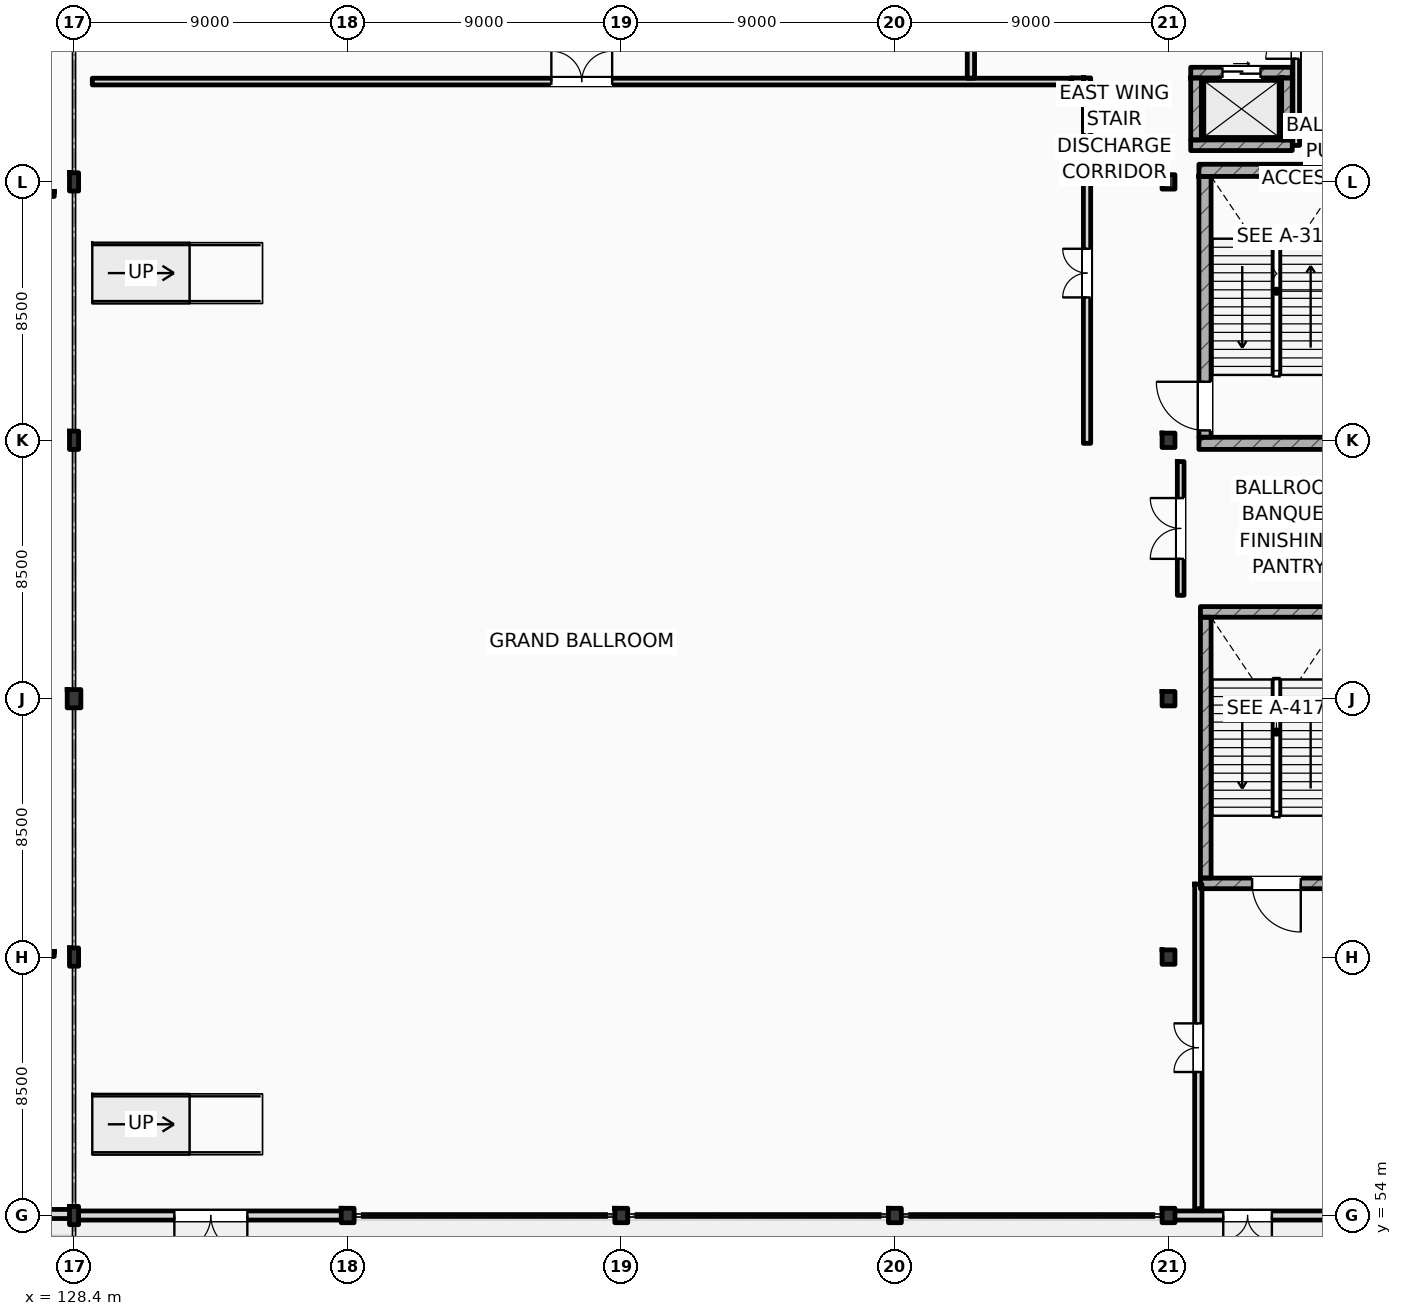
"""IFC4 building model, lengths in metres.
Left out: names, types, materials, properties, quantities, classifications, styles, units other than length and angle.
Written with IfcOpenShell. Run it as: python <this file> out.ifc"""

import sys

from ifc_helpers import new_model, si_unit, direction, frame, frame_2d, origin, origin_2d, place, context, subcontext, project, spatial, rectangle, i_section, extrude, element, fill, save


model = new_model("IFC4")
c1 = context("Model", 3, precision=1e-05, world=origin(), true_north=direction((0.0, 1.0)))
c2 = subcontext(c1, "Body", "Model", "MODEL_VIEW")
j1 = project(units=[si_unit("LENGTHUNIT", "METRE"), si_unit("PLANEANGLEUNIT", "RADIAN")], contexts=[c1])
p1 = place(None, origin())
s1 = spatial("IfcSite", under=j1, at=p1, CompositionType="ELEMENT")
p2 = place(p1, origin())
s2 = spatial("IfcBuilding", under=s1, at=p2, CompositionType="ELEMENT")
p3 = place(p2, origin())
s3 = spatial("IfcBuildingStorey", under=s2, at=p3, CompositionType="ELEMENT", Elevation=0.0)
for number, where, z_axis, x_axis in (
    (1, (128.4, 54.0, 0.0), (0.0, 0.0, 1.0), (1.0, 0.0, 0.0)),
    (2, (128.4, 62.5, 0.0), (0.0, 0.0, 1.0), (1.0, 0.0, 0.0)),
):
    element("IfcColumn", number, at=place(p3, frame(where, z_axis=z_axis, x_axis=x_axis)), inside=s3, PredefinedType="COLUMN", context=c2, shape_type="SweptSolid", body=[
        extrude(i_section(OverallWidth=0.3, OverallDepth=0.6, WebThickness=0.015, FlangeThickness=0.03, FilletRadius=0.027, at=origin_2d()), origin(), (0.0, 0.0, 1.0), 6.0),
    ])
p4 = place(p3, frame((128.4, 71.0, 0.0), z_axis=(0.0, 0.0, 1.0), x_axis=(1.0, 0.0, 0.0)))
e3 = element("IfcColumn", 3, at=p4, inside=s3, PredefinedType="PILASTER", context=c2, shape_type="SweptSolid", body=[
    extrude(rectangle(XDim=0.45, YDim=0.6, at=origin_2d()), origin(), (0.0, 0.0, 1.0), 6.0),
])
for number, where, z_axis, x_axis in (
    (4, (128.4, 79.5, 0.0), (0.0, 0.0, 1.0), (1.0, 0.0, 0.0)),
    (5, (128.4, 88.0, 0.0), (0.0, 0.0, 1.0), (1.0, 0.0, 0.0)),
):
    element("IfcColumn", number, at=place(p3, frame(where, z_axis=z_axis, x_axis=x_axis)), inside=s3, PredefinedType="COLUMN", context=c2, shape_type="SweptSolid", body=[
        extrude(i_section(OverallWidth=0.3, OverallDepth=0.6, WebThickness=0.015, FlangeThickness=0.03, FilletRadius=0.027, at=origin_2d()), origin(), (0.0, 0.0, 1.0), 6.0),
    ])
for number, where, z_axis, x_axis in (
    (6, (164.4, 54.0, 0.0), (0.0, 0.0, 1.0), (1.0, 0.0, 0.0)),
    (7, (164.4, 62.5, 0.0), (0.0, 0.0, 1.0), (1.0, 0.0, 0.0)),
    (8, (164.4, 71.0, 0.0), (0.0, 0.0, 1.0), (1.0, 0.0, 0.0)),
    (9, (164.4, 79.5, 0.0), (0.0, 0.0, 1.0), (1.0, 0.0, 0.0)),
    (10, (164.4, 88.0, 0.0), (0.0, 0.0, 1.0), (1.0, 0.0, 0.0)),
    (11, (137.4, 54.0, 0.0), (0.0, 0.0, 1.0), (1.0, 0.0, 0.0)),
    (12, (146.4, 54.0, 0.0), (0.0, 0.0, 1.0), (1.0, 0.0, 0.0)),
    (13, (155.4, 54.0, 0.0), (0.0, 0.0, 1.0), (1.0, 0.0, 0.0)),
):
    element("IfcColumn", number, at=place(p3, frame(where, z_axis=z_axis, x_axis=x_axis)), inside=s3, PredefinedType="COLUMN", context=c2, shape_type="SweptSolid", body=[
        extrude(i_section(OverallWidth=0.424, OverallDepth=0.474, WebThickness=0.045, FlangeThickness=0.055, FilletRadius=0.015, at=origin_2d()), origin(), (0.0, 0.0, 1.0), 6.0),
    ])
for number, where, z_axis, x_axis in (
    (14, (165.4, 88.38, 0.0), (0.0, 0.0, 1.0), (1.0, 0.0, 0.0)),
    (15, (165.4, 79.4, 0.0), (0.0, 0.0, 1.0), (1.0, 0.0, 0.0)),
):
    element("IfcWall", number, at=place(p3, frame(where, z_axis=z_axis, x_axis=x_axis)), inside=s3, PredefinedType="SHEAR", context=c2, shape_type="SweptSolid", body=[
        extrude(rectangle(XDim=5.1, YDim=0.4, at=frame_2d((2.55, 0.0))), origin(), (0.0, 0.0, 1.0), 6.0),
    ])
p5 = place(p3, frame((165.6, 79.6, 0.0), z_axis=(0.0, 0.0, 1.0), x_axis=(0.0, 1.0, 0.0)))
e16 = element("IfcWall", 16, at=p5, inside=s3, PredefinedType="SHEAR", context=c2, shape_type="SweptSolid", body=[
    extrude(rectangle(XDim=8.58, YDim=0.4, at=frame_2d((4.29, 0.0))), origin(), (0.0, 0.0, 1.0), 6.0),
])
p6 = place(p5, frame((0.225, 0.0, 0.0)))
e17 = element("IfcOpeningElement", 17, at=p6, cuts=e16, PredefinedType="OPENING", context=c2, shape_type="SweptSolid", body=[
    extrude(rectangle(XDim=1.6, YDim=2.2, at=frame_2d((0.8, 1.1))), frame((0.0, 0.21, 0.0), z_axis=(0.0, -1.0, 0.0), x_axis=(1.0, 0.0, 0.0)), (0.0, 0.0, 1.0), 0.42),
])
p7 = place(p3, frame((165.45, 73.855, 0.0), z_axis=(0.0, 0.0, 1.0), x_axis=(1.0, 0.0, 0.0)))
e18 = element("IfcWall", 18, at=p7, inside=s3, PredefinedType="SHEAR", context=c2, shape_type="SweptSolid", body=[
    extrude(rectangle(XDim=5.0, YDim=0.35, at=frame_2d((2.5, 0.0))), origin(), (0.0, 0.0, 1.0), 6.0),
])
p8 = place(p3, frame((165.45, 64.925, 0.0), z_axis=(0.0, 0.0, 1.0), x_axis=(1.0, 0.0, 0.0)))
e19 = element("IfcWall", 19, at=p8, inside=s3, PredefinedType="SHEAR", context=c2, shape_type="SweptSolid", body=[
    extrude(rectangle(XDim=5.0, YDim=0.35, at=frame_2d((2.5, 0.0))), origin(), (0.0, 0.0, 1.0), 6.0),
])
p9 = place(p8, frame((1.7, 0.0, 0.0)))
e20 = element("IfcOpeningElement", 20, at=p9, cuts=e19, PredefinedType="OPENING", context=c2, shape_type="SweptSolid", body=[
    extrude(rectangle(XDim=1.6, YDim=2.2, at=frame_2d((0.8, 1.1))), frame((0.0, 0.185, 0.0), z_axis=(0.0, -1.0, 0.0), x_axis=(1.0, 0.0, 0.0)), (0.0, 0.0, 1.0), 0.37),
])
p10 = place(p3, frame((165.625, 65.1, 0.0), z_axis=(0.0, 0.0, 1.0), x_axis=(0.0, 1.0, 0.0)))
e21 = element("IfcWall", 21, at=p10, inside=s3, PredefinedType="SHEAR", context=c2, shape_type="SweptSolid", body=[
    extrude(rectangle(XDim=8.58, YDim=0.35, at=frame_2d((4.29, 0.0))), origin(), (0.0, 0.0, 1.0), 6.0),
])
p11 = place(p3, frame((128.4, 54.0, 0.0), z_axis=(0.0, 0.0, 1.0), x_axis=(1.0, 0.0, 0.0)))
e22 = element("IfcWall", 22, at=p11, inside=s3, PredefinedType="STANDARD", context=c2, shape_type="SweptSolid", body=[
    extrude(rectangle(XDim=9.0, YDim=0.3, at=frame_2d((4.5, 0.0))), origin(), (0.0, 0.0, 1.0), 5.09),
])
p12 = place(p11, frame((3.3, 0.0, 0.0)))
e23 = element("IfcOpeningElement", 23, at=p12, cuts=e22, PredefinedType="OPENING", context=c2, shape_type="SweptSolid", body=[
    extrude(rectangle(XDim=2.4, YDim=2.6, at=frame_2d((1.2, 1.3))), frame((0.0, 0.16, 0.0), z_axis=(0.0, -1.0, 0.0), x_axis=(1.0, 0.0, 0.0)), (0.0, 0.0, 1.0), 0.32),
])
p13 = place(p3, frame((164.4, 54.0, 0.0), z_axis=(0.0, 0.0, 1.0), x_axis=(1.0, 0.0, 0.0)))
e24 = element("IfcWall", 24, at=p13, inside=s3, PredefinedType="STANDARD", context=c2, shape_type="SweptSolid", body=[
    extrude(rectangle(XDim=7.6, YDim=0.3, at=frame_2d((3.8, 0.0))), origin(), (0.0, 0.0, 1.0), 5.19),
])
p14 = place(p13, frame((1.8, 0.0, 0.0)))
e25 = element("IfcOpeningElement", 25, at=p14, cuts=e24, PredefinedType="OPENING", context=c2, shape_type="SweptSolid", body=[
    extrude(rectangle(XDim=1.6, YDim=2.3, at=frame_2d((0.8, 1.15))), frame((0.0, 0.16, 0.0), z_axis=(0.0, -1.0, 0.0), x_axis=(1.0, 0.0, 0.0)), (0.0, 0.0, 1.0), 0.32),
])
p15 = place(p3, frame((103.2, 54.05, 0.0), z_axis=(0.0, 0.0, 1.0), x_axis=(1.0, 0.0, 0.0)))
e26 = element("IfcWall", 26, at=p15, inside=s3, PredefinedType="STANDARD", context=c2, shape_type="SweptSolid", body=[
    extrude(rectangle(XDim=25.15, YDim=0.3, at=frame_2d((12.575, 0.0))), origin(), (0.0, 0.0, 1.0), 5.14),
])
p16 = place(p15, frame((5.95, 0.0, 0.0)))
e27 = element("IfcOpeningElement", 27, at=p16, cuts=e26, PredefinedType="OPENING", context=c2, shape_type="SweptSolid", body=[
    extrude(rectangle(XDim=1.0, YDim=2.15, at=frame_2d((0.5, 1.075))), frame((0.0, 0.16, 0.0), z_axis=(0.0, -1.0, 0.0), x_axis=(1.0, 0.0, 0.0)), (0.0, 0.0, 1.0), 0.32),
])
p17 = place(p15, frame((18.2, 0.0, 0.0)))
e28 = element("IfcOpeningElement", 28, at=p17, cuts=e26, PredefinedType="OPENING", context=c2, shape_type="SweptSolid", body=[
    extrude(rectangle(XDim=1.8, YDim=2.4, at=frame_2d((0.9, 1.2))), frame((0.0, 0.16, 0.0), z_axis=(0.0, -1.0, 0.0), x_axis=(1.0, 0.0, 0.0)), (0.0, 0.0, 1.0), 0.32),
])
p18 = place(p3, frame((165.13, 91.595, 0.0), z_axis=(0.0, 0.0, 1.0), x_axis=(1.0, 0.0, 0.0)))
e29 = element("IfcWall", 29, at=p18, inside=s3, PredefinedType="SHEAR", context=c2, shape_type="SweptSolid", body=[
    extrude(rectangle(XDim=3.34, YDim=0.35, at=frame_2d((1.67, 0.0))), origin(), (0.0, 0.0, 1.0), 5.7),
])
p19 = place(p18, frame((1.045, 0.0, 0.0)))
e30 = element("IfcOpeningElement", 30, at=p19, cuts=e29, PredefinedType="OPENING", context=c2, shape_type="SweptSolid", body=[
    extrude(rectangle(XDim=1.25, YDim=2.25, at=frame_2d((0.625, 1.125))), frame((0.0, 0.185, 0.0), z_axis=(0.0, -1.0, 0.0), x_axis=(1.0, 0.0, 0.0)), (0.0, 0.0, 1.0), 0.37),
])
p20 = place(p3, frame((165.13, 89.205, 0.0), z_axis=(0.0, 0.0, 1.0), x_axis=(1.0, 0.0, 0.0)))
e31 = element("IfcWall", 31, at=p20, inside=s3, PredefinedType="SHEAR", context=c2, shape_type="SweptSolid", body=[
    extrude(rectangle(XDim=3.34, YDim=0.35, at=frame_2d((1.67, 0.0))), origin(), (0.0, 0.0, 1.0), 5.7),
])
for number, where, z_axis, x_axis in (
    (32, (165.305, 89.38, 0.0), (0.0, 0.0, 1.0), (0.0, 1.0, 0.0)),
    (33, (168.295, 89.38, 0.0), (0.0, 0.0, 1.0), (0.0, 1.0, 0.0)),
):
    element("IfcWall", number, at=place(p3, frame(where, z_axis=z_axis, x_axis=x_axis)), inside=s3, PredefinedType="SHEAR", context=c2, shape_type="SweptSolid", body=[
        extrude(rectangle(XDim=2.04, YDim=0.35, at=frame_2d((1.02, 0.0))), origin(), (0.0, 0.0, 1.0), 5.7),
    ])
p21 = place(p3, frame((122.25, 62.6, 0.0), z_axis=(0.0, 0.0, 1.0), x_axis=(1.0, 0.0, 0.0)))
e34 = element("IfcWall", 34, at=p21, inside=s3, PredefinedType="PARTITIONING", context=c2, shape_type="SweptSolid", body=[
    extrude(rectangle(XDim=5.5, YDim=0.16, at=frame_2d((2.75, 0.0))), origin(), (0.0, 0.0, 1.0), 5.14),
])
p22 = place(p21, frame((2.1, 0.0, 0.0)))
e35 = element("IfcOpeningElement", 35, at=p22, cuts=e34, PredefinedType="OPENING", context=c2, shape_type="SweptSolid", body=[
    extrude(rectangle(XDim=1.3, YDim=2.2, at=frame_2d((0.65, 1.1))), frame((0.0, 0.09, 0.0), z_axis=(0.0, -1.0, 0.0), x_axis=(1.0, 0.0, 0.0)), (0.0, 0.0, 1.0), 0.18),
])
p23 = place(p3, frame((120.25, 87.6, 0.0), z_axis=(0.0, 0.0, 1.0), x_axis=(1.0, 0.0, 0.0)))
e36 = element("IfcWall", 36, at=p23, inside=s3, PredefinedType="PARTITIONING", context=c2, shape_type="SweptSolid", body=[
    extrude(rectangle(XDim=7.5, YDim=0.16, at=frame_2d((3.75, 0.0))), origin(), (0.0, 0.0, 1.0), 5.7),
])
p24 = place(p23, frame((3.1, 0.0, 0.0)))
e37 = element("IfcOpeningElement", 37, at=p24, cuts=e36, PredefinedType="OPENING", context=c2, shape_type="SweptSolid", body=[
    extrude(rectangle(XDim=1.3, YDim=2.2, at=frame_2d((0.65, 1.1))), frame((0.0, 0.09, 0.0), z_axis=(0.0, -1.0, 0.0), x_axis=(1.0, 0.0, 0.0)), (0.0, 0.0, 1.0), 0.18),
])
p25 = place(p3, frame((129.0, 91.3, 0.0), z_axis=(0.0, 0.0, 1.0), x_axis=(1.0, 0.0, 0.0)))
e38 = element("IfcWall", 38, at=p25, inside=s3, PredefinedType="PARTITIONING", context=c2, shape_type="SweptSolid", body=[
    extrude(rectangle(XDim=32.2, YDim=0.22, at=frame_2d((16.1, 0.0))), origin(), (0.0, 0.0, 1.0), 5.7),
])
p26 = place(p25, frame((15.1, 0.0, 0.0)))
e39 = element("IfcOpeningElement", 39, at=p26, cuts=e38, PredefinedType="OPENING", context=c2, shape_type="SweptSolid", body=[
    extrude(rectangle(XDim=2.0, YDim=2.35, at=frame_2d((1.0, 1.175))), frame((0.0, 0.12, 0.0), z_axis=(0.0, -1.0, 0.0), x_axis=(1.0, 0.0, 0.0)), (0.0, 0.0, 1.0), 0.24),
])
p27 = place(p3, frame((164.8, 74.4, 0.0), z_axis=(0.0, 0.0, 1.0), x_axis=(0.0, 1.0, 0.0)))
e40 = element("IfcWall", 40, at=p27, inside=s3, PredefinedType="PARTITIONING", context=c2, shape_type="SweptSolid", body=[
    extrude(rectangle(XDim=4.4, YDim=0.22, at=frame_2d((2.2, 0.0))), origin(), (0.0, 0.0, 1.0), 5.7),
])
p28 = place(p27, frame((1.2, 0.0, 0.0)))
e41 = element("IfcOpeningElement", 41, at=p28, cuts=e40, PredefinedType="OPENING", context=c2, shape_type="SweptSolid", body=[
    extrude(rectangle(XDim=2.0, YDim=2.35, at=frame_2d((1.0, 1.175))), frame((0.0, 0.12, 0.0), z_axis=(0.0, -1.0, 0.0), x_axis=(1.0, 0.0, 0.0)), (0.0, 0.0, 1.0), 0.24),
])
p29 = place(p3, frame((168.6, 89.2, 0.0), z_axis=(0.0, 0.0, 1.0), x_axis=(0.0, 1.0, 0.0)))
e42 = element("IfcWall", 42, at=p29, inside=s3, PredefinedType="PARTITIONING", context=c2, shape_type="SweptSolid", body=[
    extrude(rectangle(XDim=6.2, YDim=0.22, at=frame_2d((3.1, 0.0))), origin(), (0.0, 0.0, 1.0), 5.7),
])
p30 = place(p29, frame((2.85, 0.0, 0.0)))
e43 = element("IfcOpeningElement", 43, at=p30, cuts=e42, PredefinedType="OPENING", context=c2, shape_type="SweptSolid", body=[
    extrude(rectangle(XDim=2.0, YDim=2.35, at=frame_2d((1.0, 1.175))), frame((0.0, 0.12, 0.0), z_axis=(0.0, -1.0, 0.0), x_axis=(1.0, 0.0, 0.0)), (0.0, 0.0, 1.0), 0.24),
])
p31 = place(p3, frame((161.72, 79.4, 0.0), z_axis=(0.0, 0.0, 1.0), x_axis=(0.0, 1.0, 0.0)))
e44 = element("IfcWall", 44, at=p31, inside=s3, PredefinedType="STANDARD", context=c2, shape_type="SweptSolid", body=[
    extrude(rectangle(XDim=12.02, YDim=0.24, at=frame_2d((6.01, 0.0))), origin(), (0.0, 0.0, 1.0), 5.7),
])
p32 = place(p31, frame((4.8, 0.0, 0.0)))
e45 = element("IfcOpeningElement", 45, at=p32, cuts=e44, PredefinedType="OPENING", context=c2, shape_type="SweptSolid", body=[
    extrude(rectangle(XDim=1.6, YDim=2.2, at=frame_2d((0.8, 1.1))), frame((0.0, 0.13, 0.0), z_axis=(0.0, -1.0, 0.0), x_axis=(1.0, 0.0, 0.0)), (0.0, 0.0, 1.0), 0.26),
])
p33 = place(p3, frame((157.9, 91.41, 0.0), z_axis=(0.0, 0.0, 1.0), x_axis=(0.0, 1.0, 0.0)))
e46 = element("IfcWall", 46, at=p33, inside=s3, PredefinedType="STANDARD", context=c2, shape_type="SweptSolid", body=[
    extrude(rectangle(XDim=4.41, YDim=0.24, at=frame_2d((2.205, 0.0))), origin(), (0.0, 0.0, 1.0), 5.7),
])
p34 = place(p33, frame((1.5, 0.0, 0.0)))
e47 = element("IfcOpeningElement", 47, at=p34, cuts=e46, PredefinedType="OPENING", context=c2, shape_type="SweptSolid", body=[
    extrude(rectangle(XDim=1.1, YDim=2.2, at=frame_2d((0.55, 1.1))), frame((0.0, 0.13, 0.0), z_axis=(0.0, -1.0, 0.0), x_axis=(1.0, 0.0, 0.0)), (0.0, 0.0, 1.0), 0.26),
])
p35 = place(p3, frame((161.2, 91.3, 0.0), z_axis=(0.0, 0.0, 1.0), x_axis=(1.0, 0.0, 0.0)))
e48 = element("IfcWall", 48, at=p35, inside=s3, PredefinedType="STANDARD", context=c2, shape_type="SweptSolid", body=[
    extrude(rectangle(XDim=0.4, YDim=0.24, at=frame_2d((0.2, 0.0))), origin(), (0.0, 0.0, 1.0), 5.7),
])
p36 = place(p3, frame((165.38, 54.22, 0.0), z_axis=(0.0, 0.0, 1.0), x_axis=(0.0, 1.0, 0.0)))
e49 = element("IfcWall", 49, at=p36, inside=s3, PredefinedType="STANDARD", context=c2, shape_type="SweptSolid", body=[
    extrude(rectangle(XDim=10.68, YDim=0.24, at=frame_2d((5.34, 0.0))), origin(), (0.0, 0.0, 1.0), 5.7),
])
p37 = place(p36, frame((4.5, 0.0, 0.0)))
e50 = element("IfcOpeningElement", 50, at=p37, cuts=e49, PredefinedType="OPENING", context=c2, shape_type="SweptSolid", body=[
    extrude(rectangle(XDim=1.6, YDim=2.2, at=frame_2d((0.8, 1.1))), frame((0.0, 0.13, 0.0), z_axis=(0.0, -1.0, 0.0), x_axis=(1.0, 0.0, 0.0)), (0.0, 0.0, 1.0), 0.26),
])
p38 = place(p12, frame((2.4, 0.0, 0.0), z_axis=(0.0, 0.0, 1.0), x_axis=(-1.0, 0.0, 0.0)))
e51 = element("IfcDoor", 51, at=p38, inside=s3, OperationType="DOUBLE_SWING_LEFT", PredefinedType="DOOR", context=c2, shape_type="SweptSolid", body=[
    extrude(rectangle(XDim=2.4, YDim=2.6, at=frame_2d((1.2, 1.3))), frame((0.0, 0.025, 0.0), z_axis=(0.0, -1.0, 0.0), x_axis=(1.0, 0.0, 0.0)), (0.0, 0.0, 1.0), 0.05),
])
fill(e23, e51)
p39 = place(p14, frame((1.6, 0.0, 0.0), z_axis=(0.0, 0.0, 1.0), x_axis=(-1.0, 0.0, 0.0)))
e52 = element("IfcDoor", 52, at=p39, inside=s3, OperationType="DOUBLE_SWING_LEFT", PredefinedType="DOOR", context=c2, shape_type="SweptSolid", body=[
    extrude(rectangle(XDim=1.6, YDim=2.3, at=frame_2d((0.8, 1.15))), frame((0.0, 0.025, 0.0), z_axis=(0.0, -1.0, 0.0), x_axis=(1.0, 0.0, 0.0)), (0.0, 0.0, 1.0), 0.05),
])
fill(e25, e52)
p40 = place(p6, origin())
e53 = element("IfcDoor", 53, at=p40, inside=s3, OperationType="SINGLE_SWING_RIGHT", PredefinedType="DOOR", context=c2, shape_type="SweptSolid", body=[
    extrude(rectangle(XDim=1.6, YDim=2.2, at=frame_2d((0.8, 1.1))), frame((0.0, 0.025, 0.0), z_axis=(0.0, -1.0, 0.0), x_axis=(1.0, 0.0, 0.0)), (0.0, 0.0, 1.0), 0.05),
])
fill(e17, e53)
p41 = place(p9, frame((1.6, 0.0, 0.0), z_axis=(0.0, 0.0, 1.0), x_axis=(-1.0, 0.0, 0.0)))
e54 = element("IfcDoor", 54, at=p41, inside=s3, OperationType="SINGLE_SWING_RIGHT", PredefinedType="DOOR", context=c2, shape_type="SweptSolid", body=[
    extrude(rectangle(XDim=1.6, YDim=2.2, at=frame_2d((0.8, 1.1))), frame((0.0, 0.025, 0.0), z_axis=(0.0, -1.0, 0.0), x_axis=(1.0, 0.0, 0.0)), (0.0, 0.0, 1.0), 0.05),
])
fill(e20, e54)
p42 = place(p19, origin())
e55 = element("IfcDoor", 55, at=p42, inside=s3, OperationType="SLIDING_TO_LEFT", PredefinedType="DOOR", context=c2, shape_type="SweptSolid", body=[
    extrude(rectangle(XDim=1.25, YDim=2.25, at=frame_2d((0.625, 1.125))), frame((0.0, 0.025, 0.0), z_axis=(0.0, -1.0, 0.0), x_axis=(1.0, 0.0, 0.0)), (0.0, 0.0, 1.0), 0.05),
])
fill(e30, e55)
p43 = place(p26, origin())
e56 = element("IfcDoor", 56, at=p43, inside=s3, OperationType="DOUBLE_SWING_LEFT", PredefinedType="DOOR", context=c2, shape_type="SweptSolid", body=[
    extrude(rectangle(XDim=2.0, YDim=2.35, at=frame_2d((1.0, 1.175))), frame((0.0, 0.025, 0.0), z_axis=(0.0, -1.0, 0.0), x_axis=(1.0, 0.0, 0.0)), (0.0, 0.0, 1.0), 0.05),
])
fill(e39, e56)
p44 = place(p28, origin())
e57 = element("IfcDoor", 57, at=p44, inside=s3, OperationType="DOUBLE_SWING_LEFT", PredefinedType="DOOR", context=c2, shape_type="SweptSolid", body=[
    extrude(rectangle(XDim=2.0, YDim=2.35, at=frame_2d((1.0, 1.175))), frame((0.0, 0.025, 0.0), z_axis=(0.0, -1.0, 0.0), x_axis=(1.0, 0.0, 0.0)), (0.0, 0.0, 1.0), 0.05),
])
fill(e41, e57)
p45 = place(p30, origin())
e58 = element("IfcDoor", 58, at=p45, inside=s3, OperationType="DOUBLE_SWING_LEFT", PredefinedType="DOOR", context=c2, shape_type="SweptSolid", body=[
    extrude(rectangle(XDim=2.0, YDim=2.35, at=frame_2d((1.0, 1.175))), frame((0.0, 0.025, 0.0), z_axis=(0.0, -1.0, 0.0), x_axis=(1.0, 0.0, 0.0)), (0.0, 0.0, 1.0), 0.05),
])
fill(e43, e58)
p46 = place(p32, origin())
e59 = element("IfcDoor", 59, at=p46, inside=s3, OperationType="DOUBLE_SWING_LEFT", PredefinedType="DOOR", context=c2, shape_type="SweptSolid", body=[
    extrude(rectangle(XDim=1.6, YDim=2.2, at=frame_2d((0.8, 1.1))), frame((0.0, 0.025, 0.0), z_axis=(0.0, -1.0, 0.0), x_axis=(1.0, 0.0, 0.0)), (0.0, 0.0, 1.0), 0.05),
])
fill(e45, e59)
p47 = place(p37, origin())
e60 = element("IfcDoor", 60, at=p47, inside=s3, OperationType="DOUBLE_SWING_LEFT", PredefinedType="DOOR", context=c2, shape_type="SweptSolid", body=[
    extrude(rectangle(XDim=1.6, YDim=2.2, at=frame_2d((0.8, 1.1))), frame((0.0, 0.025, 0.0), z_axis=(0.0, -1.0, 0.0), x_axis=(1.0, 0.0, 0.0)), (0.0, 0.0, 1.0), 0.05),
])
fill(e50, e60)
save(model, sys.argv[1])
